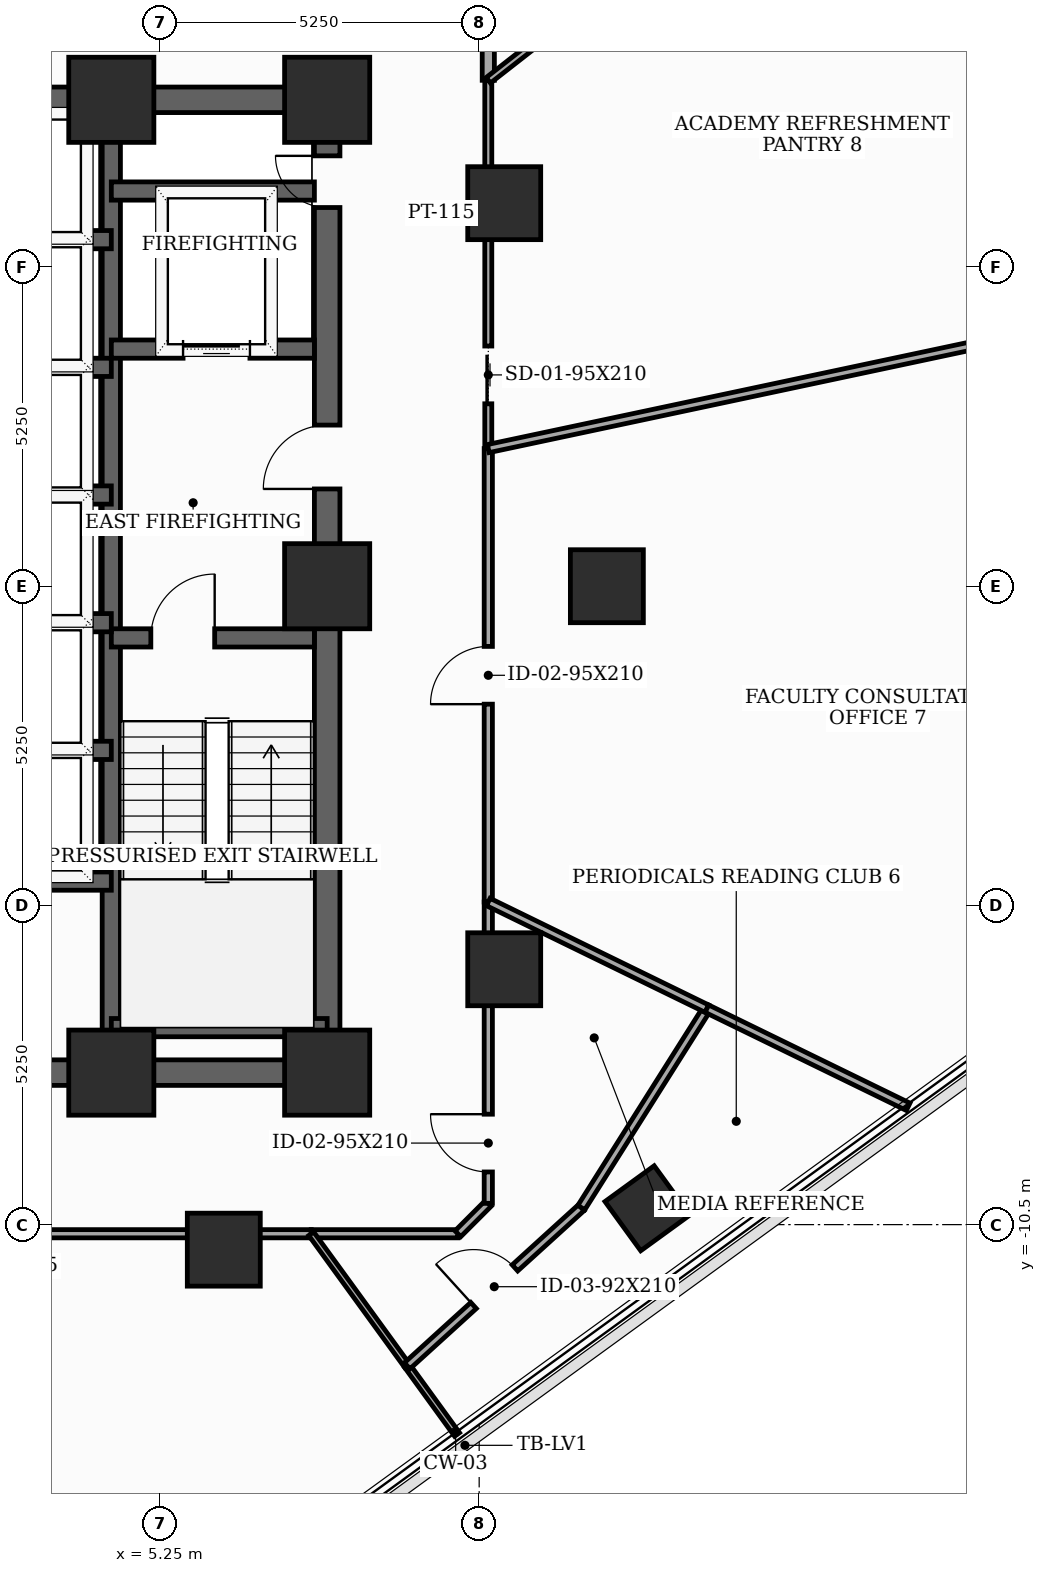
"""IFC4 building model, lengths in metres.
Left out: names, types, materials, properties, quantities, classifications, styles, units other than length and angle.
Written with IfcOpenShell. Run it as: python <this file> out.ifc"""

import sys

from ifc_helpers import new_model, si_unit, direction, frame, frame_2d, origin, origin_2d, place, context, subcontext, project, spatial, rectangle, extrude, element, fill, save


model = new_model("IFC4")
c1 = context("Model", 3, precision=1e-05, world=origin(), true_north=direction((0.0, 1.0)))
c2 = subcontext(c1, "Body", "Model", "MODEL_VIEW")
j1 = project(units=[si_unit("LENGTHUNIT", "METRE"), si_unit("PLANEANGLEUNIT", "RADIAN")], contexts=[c1])
p1 = place(None, origin())
s1 = spatial("IfcSite", under=j1, at=p1, CompositionType="ELEMENT")
p2 = place(p1, origin())
s2 = spatial("IfcBuilding", under=s1, at=p2, CompositionType="ELEMENT")
p3 = place(p2, frame((0.0, 0.0, 165.7)))
s3 = spatial("IfcBuildingStorey", under=s2, at=p3, CompositionType="ELEMENT", Elevation=165.7)
for number, where, z_axis, x_axis in (
    (1, (4.45, -8.0, 0.0), (0.0, 0.0, 1.0), (1.0, 0.0, 0.0)),
    (2, (8.0, -8.0, 0.0), (0.0, 0.0, 1.0), (1.0, 0.0, 0.0)),
    (3, (8.0, 0.0, 0.0), (0.0, 0.0, 1.0), (1.0, 0.0, 0.0)),
    (4, (8.0, 8.0, 0.0), (0.0, 0.0, 1.0), (1.0, 0.0, 0.0)),
    (5, (4.45, 8.0, 0.0), (0.0, 0.0, 1.0), (1.0, 0.0, 0.0)),
):
    element("IfcColumn", number, at=place(p3, frame(where, z_axis=z_axis, x_axis=x_axis)), inside=s3, PredefinedType="COLUMN", context=c2, shape_type="SweptSolid", body=[
        extrude(rectangle(XDim=1.4, YDim=1.4, at=origin_2d()), origin(), (0.0, 0.0, 1.0), 3.7),
    ])
for number, where, z_axis, x_axis in (
    (6, (12.6, 0.0, 0.0), (0.0, 0.0, 1.0), (1.0, 0.0, 0.0)),
    (7, (10.912, 6.3, 0.0), (0.0, 0.0, 1.0), (1.0, 0.0, 0.0)),
    (8, (6.3, -10.912, 0.0), (0.0, 0.0, 1.0), (1.0, 0.0, 0.0)),
    (9, (10.912, -6.3, 0.0), (0.0, 0.0, 1.0), (1.0, 0.0, 0.0)),
):
    element("IfcColumn", number, at=place(p3, frame(where, z_axis=z_axis, x_axis=x_axis)), inside=s3, PredefinedType="COLUMN", context=c2, shape_type="SweptSolid", body=[
        extrude(rectangle(XDim=1.2, YDim=1.2, at=origin_2d()), origin(), (0.0, 0.0, 1.0), 3.7),
    ])
p4 = place(p3, frame((13.268, -10.231, 0.0), z_axis=(0.0, 0.0, 1.0), x_axis=(0.809016994375, 0.587785252292, 0.0)))
e10 = element("IfcColumn", 10, at=p4, inside=s3, PredefinedType="COLUMN", context=c2, shape_type="SweptSolid", body=[
    extrude(rectangle(XDim=1.0, YDim=1.0, at=origin_2d()), origin(), (0.0, 0.0, 1.0), 3.7),
])
p5 = place(p3, frame((8.0, -8.0, 0.0), z_axis=(0.0, 0.0, 1.0), x_axis=(0.0, 1.0, 0.0)))
e11 = element("IfcWall", 11, at=p5, inside=s3, PredefinedType="SHEAR", context=c2, shape_type="SweptSolid", body=[
    extrude(rectangle(XDim=16.0, YDim=0.42, at=frame_2d((8.0, 0.0))), origin(), (0.0, 0.0, 1.0), 3.5),
])
p6 = place(p5, frame((9.6, 0.0, 0.0)))
e12 = element("IfcOpeningElement", 12, at=p6, cuts=e11, PredefinedType="OPENING", context=c2, shape_type="SweptSolid", body=[
    extrude(rectangle(XDim=1.05, YDim=2.15, at=frame_2d((0.525, 1.075))), frame((0.0, 0.22, 0.0), z_axis=(0.0, -1.0, 0.0), x_axis=(1.0, 0.0, 0.0)), (0.0, 0.0, 1.0), 0.44),
])
p7 = place(p5, frame((14.229, 0.0, 0.0)))
e13 = element("IfcOpeningElement", 13, at=p7, cuts=e11, PredefinedType="OPENING", context=c2, shape_type="SweptSolid", body=[
    extrude(rectangle(XDim=0.85, YDim=2.02, at=frame_2d((0.425, 1.01))), frame((0.0, 0.22, 0.0), z_axis=(0.0, -1.0, 0.0), x_axis=(1.0, 0.0, 0.0)), (0.0, 0.0, 1.0), 0.44),
])
p8 = place(p3, frame((-8.0, -8.0, 0.0), z_axis=(0.0, 0.0, 1.0), x_axis=(1.0, 0.0, 0.0)))
e14 = element("IfcWall", 14, at=p8, inside=s3, PredefinedType="SHEAR", context=c2, shape_type="SweptSolid", body=[
    extrude(rectangle(XDim=16.0, YDim=0.42, at=frame_2d((8.0, 0.0))), origin(), (0.0, 0.0, 1.0), 3.5),
])
p9 = place(p8, frame((5.2, 0.0, 0.0)))
e15 = element("IfcOpeningElement", 15, at=p9, cuts=e14, PredefinedType="OPENING", context=c2, shape_type="SweptSolid", body=[
    extrude(rectangle(XDim=0.95, YDim=2.1, at=frame_2d((0.475, 1.05))), frame((0.0, 0.22, 0.0), z_axis=(0.0, -1.0, 0.0), x_axis=(1.0, 0.0, 0.0)), (0.0, 0.0, 1.0), 0.44),
])
p10 = place(p8, frame((9.8, 0.0, 0.0)))
e16 = element("IfcOpeningElement", 16, at=p10, cuts=e14, PredefinedType="OPENING", context=c2, shape_type="SweptSolid", body=[
    extrude(rectangle(XDim=0.95, YDim=2.1, at=frame_2d((0.475, 1.05))), frame((0.0, 0.22, 0.0), z_axis=(0.0, -1.0, 0.0), x_axis=(1.0, 0.0, 0.0)), (0.0, 0.0, 1.0), 0.44),
])
p11 = place(p3, frame((-8.0, 8.0, 0.0), z_axis=(0.0, 0.0, 1.0), x_axis=(1.0, 0.0, 0.0)))
e17 = element("IfcWall", 17, at=p11, inside=s3, PredefinedType="SHEAR", context=c2, shape_type="SweptSolid", body=[
    extrude(rectangle(XDim=16.0, YDim=0.42, at=frame_2d((8.0, 0.0))), origin(), (0.0, 0.0, 1.0), 3.5),
])
p12 = place(p11, frame((7.1, 0.0, 0.0)))
e18 = element("IfcOpeningElement", 18, at=p12, cuts=e17, PredefinedType="OPENING", context=c2, shape_type="SweptSolid", body=[
    extrude(rectangle(XDim=1.8, YDim=2.15, at=frame_2d((0.9, 1.075))), frame((0.0, 0.22, 0.0), z_axis=(0.0, -1.0, 0.0), x_axis=(1.0, 0.0, 0.0)), (0.0, 0.0, 1.0), 0.44),
])
p13 = place(p3, frame((4.45, -7.79, 0.0), z_axis=(0.0, 0.0, 1.0), x_axis=(0.0, 1.0, 0.0)))
e19 = element("IfcWall", 19, at=p13, inside=s3, PredefinedType="SHEAR", context=c2, shape_type="SweptSolid", body=[
    extrude(rectangle(XDim=15.58, YDim=0.3, at=frame_2d((7.79, 0.0))), origin(), (0.0, 0.0, 1.0), 3.5),
])
p14 = place(p3, frame((4.45, -0.85, 0.0), z_axis=(0.0, 0.0, 1.0), x_axis=(1.0, 0.0, 0.0)))
e20 = element("IfcWall", 20, at=p14, inside=s3, PredefinedType="SHEAR", context=c2, shape_type="SweptSolid", body=[
    extrude(rectangle(XDim=3.34, YDim=0.3, at=frame_2d((1.67, 0.0))), origin(), (0.0, 0.0, 1.0), 3.5),
])
p15 = place(p14, frame((0.65, 0.0, 0.0)))
e21 = element("IfcOpeningElement", 21, at=p15, cuts=e20, PredefinedType="OPENING", context=c2, shape_type="SweptSolid", body=[
    extrude(rectangle(XDim=1.05, YDim=2.15, at=frame_2d((0.525, 1.075))), frame((0.0, 0.16, 0.0), z_axis=(0.0, -1.0, 0.0), x_axis=(1.0, 0.0, 0.0)), (0.0, 0.0, 1.0), 0.32),
])
p16 = place(p3, frame((4.45, -7.26, 0.0), z_axis=(0.0, 0.0, 1.0), x_axis=(1.0, 0.0, 0.0)))
e22 = element("IfcWall", 22, at=p16, inside=s3, PredefinedType="SHEAR", context=c2, shape_type="SweptSolid", body=[
    extrude(rectangle(XDim=3.55, YDim=0.3, at=frame_2d((1.775, 0.0))), origin(), (0.0, 0.0, 1.0), 3.5),
])
p17 = place(p3, frame((4.45, 3.9, 0.0), z_axis=(0.0, 0.0, 1.0), x_axis=(1.0, 0.0, 0.0)))
e23 = element("IfcWall", 23, at=p17, inside=s3, PredefinedType="SHEAR", context=c2, shape_type="SweptSolid", body=[
    extrude(rectangle(XDim=3.34, YDim=0.3, at=frame_2d((1.67, 0.0))), origin(), (0.0, 0.0, 1.0), 3.5),
])
p18 = place(p17, frame((1.18, 0.0, 0.0)))
e24 = element("IfcOpeningElement", 24, at=p18, cuts=e23, PredefinedType="OPENING", context=c2, shape_type="SweptSolid", body=[
    extrude(rectangle(XDim=1.1, YDim=2.1, at=frame_2d((0.55, 1.05))), frame((0.0, 0.16, 0.0), z_axis=(0.0, -1.0, 0.0), x_axis=(1.0, 0.0, 0.0)), (0.0, 0.0, 1.0), 0.32),
])
p19 = place(p3, frame((4.45, 6.5, 0.0), z_axis=(0.0, 0.0, 1.0), x_axis=(1.0, 0.0, 0.0)))
e25 = element("IfcWall", 25, at=p19, inside=s3, PredefinedType="SHEAR", context=c2, shape_type="SweptSolid", body=[
    extrude(rectangle(XDim=3.34, YDim=0.3, at=frame_2d((1.67, 0.0))), origin(), (0.0, 0.0, 1.0), 3.5),
])
p20 = place(p3, frame((-4.45, -4.85, 0.0), z_axis=(0.0, 0.0, 1.0), x_axis=(1.0, 0.0, 0.0)))
e26 = element("IfcWall", 26, at=p20, inside=s3, PredefinedType="SHEAR", context=c2, shape_type="SweptSolid", body=[
    extrude(rectangle(XDim=8.9, YDim=0.3, at=frame_2d((4.45, 0.0))), origin(), (0.0, 0.0, 1.0), 3.5),
])
for number, where, z_axis, x_axis in (
    (27, (1.68, 1.5, 0.0), (0.0, 0.0, 1.0), (1.0, 0.0, 0.0)),
    (28, (1.68, 3.6, 0.0), (0.0, 0.0, 1.0), (1.0, 0.0, 0.0)),
    (29, (1.68, 5.7, 0.0), (0.0, 0.0, 1.0), (1.0, 0.0, 0.0)),
    (30, (1.68, -2.7, 0.0), (0.0, 0.0, 1.0), (1.0, 0.0, 0.0)),
    (31, (1.68, -0.6, 0.0), (0.0, 0.0, 1.0), (1.0, 0.0, 0.0)),
):
    element("IfcWall", number, at=place(p3, frame(where, z_axis=z_axis, x_axis=x_axis)), inside=s3, PredefinedType="SHEAR", context=c2, shape_type="SweptSolid", body=[
        extrude(rectangle(XDim=2.77, YDim=0.3, at=frame_2d((1.385, 0.0))), origin(), (0.0, 0.0, 1.0), 3.5),
    ])
p21 = place(p3, frame((-3.054, -10.65, 0.0), z_axis=(0.0, 0.0, 1.0), x_axis=(1.0, 0.0, 0.0)))
e32 = element("IfcWall", 32, at=p21, inside=s3, PredefinedType="PARTITIONING", context=c2, shape_type="SweptSolid", body=[
    extrude(rectangle(XDim=10.792, YDim=0.135, at=frame_2d((5.396, 0.0))), origin(), (0.0, 0.0, 1.0), 2.885),
])
p22 = place(p21, frame((4.596, 0.0, 0.0)))
e33 = element("IfcOpeningElement", 33, at=p22, cuts=e32, PredefinedType="OPENING", context=c2, shape_type="SweptSolid", body=[
    extrude(rectangle(XDim=1.6, YDim=2.15, at=frame_2d((0.8, 1.075))), frame((0.0, 0.077, 0.0), z_axis=(0.0, -1.0, 0.0), x_axis=(1.0, 0.0, 0.0)), (0.0, 0.0, 1.0), 0.155),
])
p23 = place(p3, frame((7.738, -10.65, 0.0), z_axis=(0.0, 0.0, 1.0), x_axis=(1.0, 0.0, 0.0)))
e34 = element("IfcWall", 34, at=p23, inside=s3, PredefinedType="PARTITIONING", context=c2, shape_type="SweptSolid", body=[
    extrude(rectangle(XDim=2.412, YDim=0.135, at=frame_2d((1.206, 0.0))), origin(), (0.0, 0.0, 1.0), 3.5),
])
p24 = place(p3, frame((10.15, -10.65, 0.0), z_axis=(0.0, 0.0, 1.0), x_axis=(0.707106781187, 0.707106781187, 0.0)))
e35 = element("IfcWall", 35, at=p24, inside=s3, PredefinedType="PARTITIONING", context=c2, shape_type="SweptSolid", body=[
    extrude(rectangle(XDim=0.707, YDim=0.135, at=frame_2d((0.354, 0.0))), origin(), (0.0, 0.0, 1.0), 3.5),
])
p25 = place(p3, frame((10.65, -10.15, 0.0), z_axis=(0.0, 0.0, 1.0), x_axis=(0.0, 1.0, 0.0)))
e36 = element("IfcWall", 36, at=p25, inside=s3, PredefinedType="PARTITIONING", context=c2, shape_type="SweptSolid", body=[
    extrude(rectangle(XDim=4.956, YDim=0.135, at=frame_2d((2.478, 0.0))), origin(), (0.0, 0.0, 1.0), 2.885),
])
p26 = place(p25, frame((0.516, 0.0, 0.0)))
e37 = element("IfcOpeningElement", 37, at=p26, cuts=e36, PredefinedType="OPENING", context=c2, shape_type="SweptSolid", body=[
    extrude(rectangle(XDim=0.95, YDim=2.1, at=frame_2d((0.475, 1.05))), frame((0.0, 0.077, 0.0), z_axis=(0.0, -1.0, 0.0), x_axis=(1.0, 0.0, 0.0)), (0.0, 0.0, 1.0), 0.155),
])
p27 = place(p3, frame((10.65, -5.194, 0.0), z_axis=(0.0, 0.0, 1.0), x_axis=(0.0, 1.0, 0.0)))
e38 = element("IfcWall", 38, at=p27, inside=s3, PredefinedType="PARTITIONING", context=c2, shape_type="SweptSolid", body=[
    extrude(rectangle(XDim=7.458, YDim=0.135, at=frame_2d((3.729, 0.0))), origin(), (0.0, 0.0, 1.0), 2.885),
])
p28 = place(p27, frame((3.254, 0.0, 0.0)))
e39 = element("IfcOpeningElement", 39, at=p28, cuts=e38, PredefinedType="OPENING", context=c2, shape_type="SweptSolid", body=[
    extrude(rectangle(XDim=0.95, YDim=2.1, at=frame_2d((0.475, 1.05))), frame((0.0, 0.077, 0.0), z_axis=(0.0, -1.0, 0.0), x_axis=(1.0, 0.0, 0.0)), (0.0, 0.0, 1.0), 0.155),
])
p29 = place(p3, frame((10.65, 2.264, 0.0), z_axis=(0.0, 0.0, 1.0), x_axis=(0.0, 1.0, 0.0)))
e40 = element("IfcWall", 40, at=p29, inside=s3, PredefinedType="PARTITIONING", context=c2, shape_type="SweptSolid", body=[
    extrude(rectangle(XDim=6.057, YDim=0.115, at=frame_2d((3.029, 0.0))), origin(), (0.0, 0.0, 1.0), 2.885),
])
p30 = place(p29, frame((0.736, 0.0, 0.0)))
e41 = element("IfcOpeningElement", 41, at=p30, cuts=e40, PredefinedType="OPENING", context=c2, shape_type="SweptSolid", body=[
    extrude(rectangle(XDim=0.95, YDim=2.1, at=frame_2d((0.475, 1.05))), frame((0.0, 0.067, 0.0), z_axis=(0.0, -1.0, 0.0), x_axis=(1.0, 0.0, 0.0)), (0.0, 0.0, 1.0), 0.135),
])
p31 = place(p3, frame((10.65, 8.321, 0.0), z_axis=(0.0, 0.0, 1.0), x_axis=(0.0, 1.0, 0.0)))
e42 = element("IfcWall", 42, at=p31, inside=s3, PredefinedType="SOLIDWALL", context=c2, shape_type="SweptSolid", body=[
    extrude(rectangle(XDim=1.829, YDim=0.2, at=frame_2d((0.915, 0.0))), origin(), (0.0, 0.0, 1.0), 3.5),
])
p32 = place(p3, frame((9.316, -12.822, 0.0), z_axis=(0.0, 0.0, 1.0), x_axis=(-0.587722823028, 0.80906234821, 0.0)))
e43 = element("IfcWall", 43, at=p32, inside=s3, PredefinedType="MOVABLE", context=c2, shape_type="SweptSolid", body=[
    extrude(rectangle(XDim=2.685, YDim=0.1, at=frame_2d((1.342, 0.0))), origin(), (0.0, 0.0, 1.0), 3.5),
])
p33 = place(p3, frame((10.136, -13.952, 0.0), z_axis=(0.0, 0.0, 1.0), x_axis=(-0.587422991792, 0.809280068156, 0.0)))
e44 = element("IfcWall", 44, at=p33, inside=s3, PredefinedType="MOVABLE", context=c2, shape_type="SweptSolid", body=[
    extrude(rectangle(XDim=1.396, YDim=0.1, at=frame_2d((0.698, 0.0))), origin(), (0.0, 0.0, 1.0), 2.985),
])
p34 = place(p3, frame((9.316, -12.822, 0.0), z_axis=(0.0, 0.0, 1.0), x_axis=(0.740145591151, 0.672446655058, 0.0)))
e45 = element("IfcWall", 45, at=p34, inside=s3, PredefinedType="PARTITIONING", context=c2, shape_type="SweptSolid", body=[
    extrude(rectangle(XDim=3.87, YDim=0.135, at=frame_2d((1.935, 0.0))), origin(), (0.0, 0.0, 1.0), 2.985),
])
p35 = place(p34, frame((1.475, 0.0, 0.0)))
e46 = element("IfcOpeningElement", 46, at=p35, cuts=e45, PredefinedType="OPENING", context=c2, shape_type="SweptSolid", body=[
    extrude(rectangle(XDim=0.92, YDim=2.1, at=frame_2d((0.46, 1.05))), frame((0.0, 0.077, 0.0), z_axis=(0.0, -1.0, 0.0), x_axis=(1.0, 0.0, 0.0)), (0.0, 0.0, 1.0), 0.155),
])
p36 = place(p3, frame((12.18, -10.22, 0.0), z_axis=(0.0, 0.0, 1.0), x_axis=(0.533748447558, 0.845643302302, 0.0)))
e47 = element("IfcWall", 47, at=p36, inside=s3, PredefinedType="PARTITIONING", context=c2, shape_type="SweptSolid", body=[
    extrude(rectangle(XDim=3.869, YDim=0.135, at=frame_2d((1.935, 0.0))), origin(), (0.0, 0.0, 1.0), 2.885),
])
p37 = place(p3, frame((14.245, -6.948, 0.0), z_axis=(0.0, 0.0, 1.0), x_axis=(-0.898754367686, 0.43845249066, 0.0)))
e48 = element("IfcWall", 48, at=p37, inside=s3, PredefinedType="PARTITIONING", context=c2, shape_type="SweptSolid", body=[
    extrude(rectangle(XDim=4.0, YDim=0.135, at=frame_2d((2.0, 0.0))), origin(), (0.0, 0.0, 1.0), 2.885),
])
p38 = place(p3, frame((17.555, -8.562, 0.0), z_axis=(0.0, 0.0, 1.0), x_axis=(-0.898837884032, 0.438281254708, 0.0)))
e49 = element("IfcWall", 49, at=p38, inside=s3, PredefinedType="PARTITIONING", context=c2, shape_type="SweptSolid", body=[
    extrude(rectangle(XDim=3.683, YDim=0.135, at=frame_2d((1.841, 0.0))), origin(), (0.0, 0.0, 1.0), 2.985),
])
p39 = place(p3, frame((28.651, 6.09, 0.0), z_axis=(0.0, 0.0, 1.0), x_axis=(-0.978150893197, -0.207896200392, 0.0)))
e50 = element("IfcWall", 50, at=p39, inside=s3, PredefinedType="PARTITIONING", context=c2, shape_type="SweptSolid", body=[
    extrude(rectangle(XDim=18.403, YDim=0.135, at=frame_2d((9.202, 0.0))), origin(), (0.0, 0.0, 1.0), 2.885),
])
p40 = place(p3, frame((12.391, 9.681, 0.0), z_axis=(0.0, 0.0, 1.0), x_axis=(-0.788124883644, -0.615515367624, 0.0)))
e51 = element("IfcWall", 51, at=p40, inside=s3, PredefinedType="PARTITIONING", context=c2, shape_type="SweptSolid", body=[
    extrude(rectangle(XDim=2.209, YDim=0.115, at=frame_2d((1.104, 0.0))), origin(), (0.0, 0.0, 1.0), 3.5),
])
p41 = place(p6, origin())
e52 = element("IfcDoor", 52, at=p41, inside=s3, OperationType="SINGLE_SWING_LEFT", PredefinedType="DOOR", context=c2, shape_type="SweptSolid", body=[
    extrude(rectangle(XDim=1.05, YDim=2.15, at=frame_2d((0.525, 1.075))), frame((0.0, 0.025, 0.0), z_axis=(0.0, -1.0, 0.0), x_axis=(1.0, 0.0, 0.0)), (0.0, 0.0, 1.0), 0.05),
])
fill(e12, e52)
p42 = place(p7, origin())
e53 = element("IfcDoor", 53, at=p42, inside=s3, OperationType="SINGLE_SWING_RIGHT", PredefinedType="TRAPDOOR", context=c2, shape_type="SweptSolid", body=[
    extrude(rectangle(XDim=0.85, YDim=2.02, at=frame_2d((0.425, 1.01))), frame((0.0, 0.025, 0.0), z_axis=(0.0, -1.0, 0.0), x_axis=(1.0, 0.0, 0.0)), (0.0, 0.0, 1.0), 0.05),
])
fill(e13, e53)
p43 = place(p15, origin())
e54 = element("IfcDoor", 54, at=p43, inside=s3, OperationType="SINGLE_SWING_RIGHT", PredefinedType="DOOR", context=c2, shape_type="SweptSolid", body=[
    extrude(rectangle(XDim=1.05, YDim=2.15, at=frame_2d((0.525, 1.075))), frame((0.0, 0.025, 0.0), z_axis=(0.0, -1.0, 0.0), x_axis=(1.0, 0.0, 0.0)), (0.0, 0.0, 1.0), 0.05),
])
fill(e21, e54)
p44 = place(p18, origin())
e55 = element("IfcDoor", 55, at=p44, inside=s3, OperationType="SLIDING_TO_LEFT", PredefinedType="DOOR", context=c2, shape_type="SweptSolid", body=[
    extrude(rectangle(XDim=1.1, YDim=2.1, at=frame_2d((0.55, 1.05))), frame((0.0, 0.025, 0.0), z_axis=(0.0, -1.0, 0.0), x_axis=(1.0, 0.0, 0.0)), (0.0, 0.0, 1.0), 0.05),
])
fill(e24, e55)
p45 = place(p26, origin())
e56 = element("IfcDoor", 56, at=p45, inside=s3, OperationType="SINGLE_SWING_RIGHT", PredefinedType="DOOR", context=c2, shape_type="SweptSolid", body=[
    extrude(rectangle(XDim=0.95, YDim=2.1, at=frame_2d((0.475, 1.05))), frame((0.0, 0.025, 0.0), z_axis=(0.0, -1.0, 0.0), x_axis=(1.0, 0.0, 0.0)), (0.0, 0.0, 1.0), 0.05),
])
fill(e37, e56)
p46 = place(p28, origin())
e57 = element("IfcDoor", 57, at=p46, inside=s3, OperationType="SINGLE_SWING_LEFT", PredefinedType="DOOR", context=c2, shape_type="SweptSolid", body=[
    extrude(rectangle(XDim=0.95, YDim=2.1, at=frame_2d((0.475, 1.05))), frame((0.0, 0.025, 0.0), z_axis=(0.0, -1.0, 0.0), x_axis=(1.0, 0.0, 0.0)), (0.0, 0.0, 1.0), 0.05),
])
fill(e39, e57)
p47 = place(p30, origin())
e58 = element("IfcDoor", 58, at=p47, inside=s3, OperationType="SLIDING_TO_LEFT", PredefinedType="DOOR", context=c2, shape_type="SweptSolid", body=[
    extrude(rectangle(XDim=0.95, YDim=2.1, at=frame_2d((0.475, 1.05))), frame((0.0, 0.025, 0.0), z_axis=(0.0, -1.0, 0.0), x_axis=(1.0, 0.0, 0.0)), (0.0, 0.0, 1.0), 0.05),
])
fill(e41, e58)
p48 = place(p35, origin())
e59 = element("IfcDoor", 59, at=p48, inside=s3, OperationType="SINGLE_SWING_LEFT", PredefinedType="DOOR", context=c2, shape_type="SweptSolid", body=[
    extrude(rectangle(XDim=0.92, YDim=2.1, at=frame_2d((0.46, 1.05))), frame((0.0, 0.025, 0.0), z_axis=(0.0, -1.0, 0.0), x_axis=(1.0, 0.0, 0.0)), (0.0, 0.0, 1.0), 0.05),
])
fill(e46, e59)
save(model, sys.argv[1])
